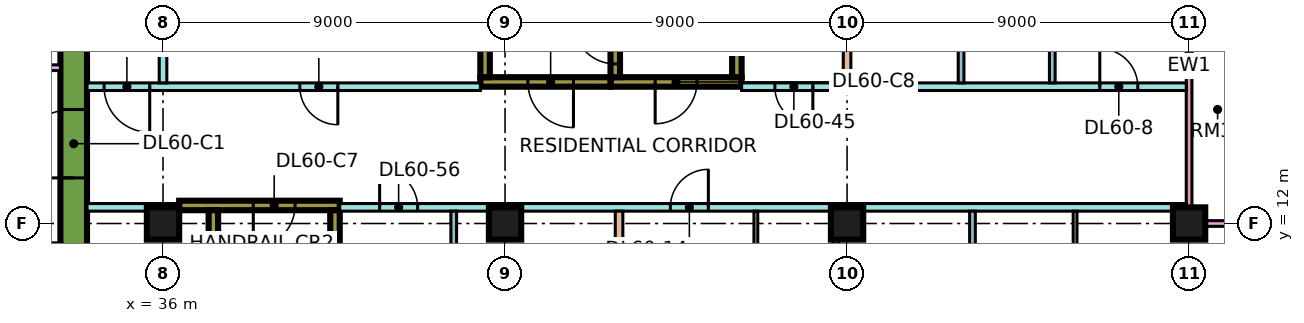
"""IFC4 building model, lengths in metres.
Left out: names, types, materials, properties, quantities, classifications, styles, units other than length and angle.
Written with IfcOpenShell. Run it as: python <this file> out.ifc"""

import sys

from ifc_helpers import new_model, si_unit, direction, frame, frame_2d, origin, origin_2d, place, context, subcontext, project, spatial, rectangle, extrude, element, fill, save


model = new_model("IFC4")
c1 = context("Model", 3, precision=1e-05, world=origin(), true_north=direction((0.0, 1.0)))
c2 = subcontext(c1, "Body", "Model", "MODEL_VIEW")
j1 = project(units=[si_unit("LENGTHUNIT", "METRE"), si_unit("PLANEANGLEUNIT", "RADIAN")], contexts=[c1])
p1 = place(None, origin())
s1 = spatial("IfcSite", under=j1, at=p1, CompositionType="ELEMENT")
p2 = place(p1, origin())
s2 = spatial("IfcBuilding", under=s1, at=p2, CompositionType="ELEMENT")
p3 = place(p2, frame((0.0, 0.0, 252.9)))
s3 = spatial("IfcBuildingStorey", under=s2, at=p3, CompositionType="ELEMENT", Elevation=252.9)
for number, where, z_axis, x_axis in (
    (1, (36.0, 12.0, 0.0), (0.0, 0.0, 1.0), (1.0, 0.0, 0.0)),
    (2, (45.0, 12.0, 0.0), (0.0, 0.0, 1.0), (1.0, 0.0, 0.0)),
    (3, (54.0, 12.0, 0.0), (0.0, 0.0, 1.0), (1.0, 0.0, 0.0)),
    (4, (63.0, 12.0, 0.0), (0.0, 0.0, 1.0), (1.0, 0.0, 0.0)),
):
    element("IfcColumn", number, at=place(p3, frame(where, z_axis=z_axis, x_axis=x_axis)), inside=s3, PredefinedType="COLUMN", context=c2, shape_type="SweptSolid", body=[
        extrude(rectangle(XDim=0.85, YDim=0.85, at=origin_2d()), origin(), (0.0, 0.0, 1.0), 3.75),
    ])
p4 = place(p3, frame((33.65, 7.7, 0.0), z_axis=(0.0, 0.0, 1.0), x_axis=(0.0, 1.0, 0.0)))
e5 = element("IfcWall", 5, at=p4, inside=s3, PredefinedType="SHEAR", context=c2, shape_type="SweptSolid", body=[
    extrude(rectangle(XDim=11.6, YDim=0.7, at=frame_2d((5.8, 0.0))), origin(), (0.0, 0.0, 1.0), 3.75),
])
p5 = place(p4, frame((5.5, 0.0, 0.0)))
e6 = element("IfcOpeningElement", 6, at=p5, cuts=e5, PredefinedType="OPENING", context=c2, shape_type="SweptSolid", body=[
    extrude(rectangle(XDim=1.8, YDim=2.4, at=frame_2d((0.9, 1.2))), frame((0.0, 0.36, 0.0), z_axis=(0.0, -1.0, 0.0), x_axis=(1.0, 0.0, 0.0)), (0.0, 0.0, 1.0), 0.72),
])
p6 = place(p3, frame((36.425, 12.475, 0.0), z_axis=(0.0, 0.0, 1.0), x_axis=(1.0, 0.0, 0.0)))
e7 = element("IfcWall", 7, at=p6, inside=s3, PredefinedType="SHEAR", context=c2, shape_type="SweptSolid", body=[
    extrude(rectangle(XDim=4.225, YDim=0.25, at=frame_2d((2.112, 0.0))), origin(), (0.0, 0.0, 1.0), 3.75),
])
p7 = place(p6, frame((1.95, 0.0, 0.0)))
e8 = element("IfcOpeningElement", 8, at=p7, cuts=e7, PredefinedType="OPENING", context=c2, shape_type="SweptSolid", body=[
    extrude(rectangle(XDim=1.1, YDim=2.2, at=frame_2d((0.55, 1.1))), frame((0.0, 0.135, 0.0), z_axis=(0.0, -1.0, 0.0), x_axis=(1.0, 0.0, 0.0)), (0.0, 0.0, 1.0), 0.27),
])
for number, where, z_axis, x_axis in (
    (9, (37.325, 5.85, 0.0), (0.0, 0.0, 1.0), (0.0, 1.0, 0.0)),
    (10, (40.525, 5.85, 0.0), (0.0, 0.0, 1.0), (0.0, 1.0, 0.0)),
):
    element("IfcWall", number, at=place(p3, frame(where, z_axis=z_axis, x_axis=x_axis)), inside=s3, PredefinedType="SHEAR", context=c2, shape_type="SweptSolid", body=[
        extrude(rectangle(XDim=6.5, YDim=0.25, at=frame_2d((3.25, 0.0))), origin(), (0.0, 0.0, 1.0), 3.75),
    ])
p8 = place(p3, frame((47.775, 15.725, 0.0), z_axis=(0.0, 0.0, 1.0), x_axis=(1.0, 0.0, 0.0)))
e11 = element("IfcWall", 11, at=p8, inside=s3, PredefinedType="SHEAR", context=c2, shape_type="SweptSolid", body=[
    extrude(rectangle(XDim=3.45, YDim=0.25, at=frame_2d((1.725, 0.0))), origin(), (0.0, 0.0, 1.0), 3.75),
])
p9 = place(p8, frame((1.175, 0.0, 0.0)))
e12 = element("IfcOpeningElement", 12, at=p9, cuts=e11, PredefinedType="OPENING", context=c2, shape_type="SweptSolid", body=[
    extrude(rectangle(XDim=1.1, YDim=2.2, at=frame_2d((0.55, 1.1))), frame((0.0, 0.135, 0.0), z_axis=(0.0, -1.0, 0.0), x_axis=(1.0, 0.0, 0.0)), (0.0, 0.0, 1.0), 0.27),
])
p10 = place(p3, frame((47.9, 15.85, 0.0), z_axis=(0.0, 0.0, 1.0), x_axis=(0.0, 1.0, 0.0)))
e13 = element("IfcWall", 13, at=p10, inside=s3, PredefinedType="SHEAR", context=c2, shape_type="SweptSolid", body=[
    extrude(rectangle(XDim=6.5, YDim=0.25, at=frame_2d((3.25, 0.0))), origin(), (0.0, 0.0, 1.0), 3.75),
])
p11 = place(p10, frame((0.35, 0.0, 0.0)))
e14 = element("IfcOpeningElement", 14, at=p11, cuts=e13, PredefinedType="OPENING", context=c2, shape_type="SweptSolid", body=[
    extrude(rectangle(XDim=1.1, YDim=2.2, at=frame_2d((0.55, 1.1))), frame((0.0, 0.135, 0.0), z_axis=(0.0, -1.0, 0.0), x_axis=(1.0, 0.0, 0.0)), (0.0, 0.0, 1.0), 0.27),
])
p12 = place(p3, frame((51.1, 15.85, 0.0), z_axis=(0.0, 0.0, 1.0), x_axis=(0.0, 1.0, 0.0)))
e15 = element("IfcWall", 15, at=p12, inside=s3, PredefinedType="SHEAR", context=c2, shape_type="SweptSolid", body=[
    extrude(rectangle(XDim=6.5, YDim=0.25, at=frame_2d((3.25, 0.0))), origin(), (0.0, 0.0, 1.0), 3.75),
])
p13 = place(p3, frame((44.35, 15.725, 0.0), z_axis=(0.0, 0.0, 1.0), x_axis=(1.0, 0.0, 0.0)))
e16 = element("IfcWall", 16, at=p13, inside=s3, PredefinedType="SHEAR", context=c2, shape_type="SweptSolid", body=[
    extrude(rectangle(XDim=3.425, YDim=0.25, at=frame_2d((1.712, 0.0))), origin(), (0.0, 0.0, 1.0), 3.75),
])
p14 = place(p13, frame((1.25, 0.0, 0.0)))
e17 = element("IfcOpeningElement", 17, at=p14, cuts=e16, PredefinedType="OPENING", context=c2, shape_type="SweptSolid", body=[
    extrude(rectangle(XDim=1.2, YDim=2.2, at=frame_2d((0.6, 1.1))), frame((0.0, 0.135, 0.0), z_axis=(0.0, -1.0, 0.0), x_axis=(1.0, 0.0, 0.0)), (0.0, 0.0, 1.0), 0.27),
])
p15 = place(p3, frame((44.475, 15.85, 0.0), z_axis=(0.0, 0.0, 1.0), x_axis=(0.0, 1.0, 0.0)))
e18 = element("IfcWall", 18, at=p15, inside=s3, PredefinedType="SHEAR", context=c2, shape_type="SweptSolid", body=[
    extrude(rectangle(XDim=6.5, YDim=0.25, at=frame_2d((3.25, 0.0))), origin(), (0.0, 0.0, 1.0), 3.75),
])
p16 = place(p15, frame((1.75, 0.0, 0.0)))
e19 = element("IfcOpeningElement", 19, at=p16, cuts=e18, PredefinedType="OPENING", context=c2, shape_type="SweptSolid", body=[
    extrude(rectangle(XDim=1.1, YDim=2.2, at=frame_2d((0.55, 1.1))), frame((0.0, 0.135, 0.0), z_axis=(0.0, -1.0, 0.0), x_axis=(1.0, 0.0, 0.0)), (0.0, 0.0, 1.0), 0.27),
])
p17 = place(p15, frame((4.3, 0.0, 0.0)))
e20 = element("IfcOpeningElement", 20, at=p17, cuts=e18, PredefinedType="OPENING", context=c2, shape_type="SweptSolid", body=[
    extrude(rectangle(XDim=1.1, YDim=2.2, at=frame_2d((0.55, 1.1))), frame((0.0, 0.135, 0.0), z_axis=(0.0, -1.0, 0.0), x_axis=(1.0, 0.0, 0.0)), (0.0, 0.0, 1.0), 0.27),
])
p18 = place(p3, frame((63.0, 12.075, 0.0), z_axis=(0.0, 0.0, 1.0), x_axis=(0.0, 1.0, 0.0)))
e21 = element("IfcWall", 21, at=p18, inside=s3, PredefinedType="SOLIDWALL", context=c2, shape_type="SweptSolid", body=[
    extrude(rectangle(XDim=10.35, YDim=0.15, at=frame_2d((5.175, 0.0))), origin(), (0.0, 0.0, 1.0), 3.3),
])
p19 = place(p18, frame((4.875, 0.0, 0.0)))
e22 = element("IfcOpeningElement", 22, at=p19, cuts=e21, PredefinedType="OPENING", context=c2, shape_type="SweptSolid", body=[
    extrude(rectangle(XDim=1.8, YDim=2.4, at=frame_2d((0.9, 1.2))), frame((0.0, 0.085, 0.0), z_axis=(0.0, -1.0, 0.0), x_axis=(1.0, 0.0, 0.0)), (0.0, 0.0, 1.0), 0.17),
])
p20 = place(p18, frame((8.587, 0.0, 0.45)))
e23 = element("IfcOpeningElement", 23, at=p20, cuts=e21, PredefinedType="OPENING", context=c2, shape_type="SweptSolid", body=[
    extrude(rectangle(XDim=1.2, YDim=2.4, at=frame_2d((0.6, 1.2))), frame((0.0, 0.085, 0.0), z_axis=(0.0, -1.0, 0.0), x_axis=(1.0, 0.0, 0.0)), (0.0, 0.0, 1.0), 0.17),
])
p21 = place(p3, frame((64.5, 12.0, 0.0), z_axis=(0.0, 0.0, 1.0), x_axis=(-1.0, 0.0, 0.0)))
e24 = element("IfcWall", 24, at=p21, inside=s3, PredefinedType="SOLIDWALL", context=c2, shape_type="SweptSolid", body=[
    extrude(rectangle(XDim=1.5, YDim=0.15, at=frame_2d((0.75, 0.0))), origin(), (0.0, 0.0, 1.0), 3.3),
])
p22 = place(p3, frame((31.3, 16.1, 0.0), z_axis=(0.0, 0.0, 1.0), x_axis=(1.0, 0.0, 0.0)))
e25 = element("IfcWall", 25, at=p22, inside=s3, PredefinedType="PARTITIONING", context=c2, shape_type="SweptSolid", body=[
    extrude(rectangle(XDim=2.0, YDim=0.15, at=frame_2d((1.0, 0.0))), origin(), (0.0, 0.0, 1.0), 3.3),
])
p23 = place(p3, frame((34.0, 12.425, 0.0), z_axis=(0.0, 0.0, 1.0), x_axis=(1.0, 0.0, 0.0)))
e26 = element("IfcWall", 26, at=p23, inside=s3, PredefinedType="PARTITIONING", context=c2, shape_type="SweptSolid", body=[
    extrude(rectangle(XDim=2.426, YDim=0.2, at=frame_2d((1.213, 0.0))), origin(), (0.0, 0.0, 1.0), 3.3),
])
p24 = place(p3, frame((34.0, 15.6, 0.0), z_axis=(0.0, 0.0, 1.0), x_axis=(1.0, 0.0, 0.0)))
e27 = element("IfcWall", 27, at=p24, inside=s3, PredefinedType="PARTITIONING", context=c2, shape_type="SweptSolid", body=[
    extrude(rectangle(XDim=10.35, YDim=0.2, at=frame_2d((5.175, 0.0))), origin(), (0.0, 0.0, 1.0), 3.3),
])
p25 = place(p24, frame((5.6, 0.0, 0.0)))
e28 = element("IfcOpeningElement", 28, at=p25, cuts=e27, PredefinedType="OPENING", context=c2, shape_type="SweptSolid", body=[
    extrude(rectangle(XDim=1.0, YDim=2.1, at=frame_2d((0.5, 1.05))), frame((0.0, 0.11, 0.0), z_axis=(0.0, -1.0, 0.0), x_axis=(1.0, 0.0, 0.0)), (0.0, 0.0, 1.0), 0.22),
])
p26 = place(p24, frame((0.45, 0.0, 0.0)))
e29 = element("IfcOpeningElement", 29, at=p26, cuts=e27, PredefinedType="OPENING", context=c2, shape_type="SweptSolid", body=[
    extrude(rectangle(XDim=1.2, YDim=2.1, at=frame_2d((0.6, 1.05))), frame((0.0, 0.11, 0.0), z_axis=(0.0, -1.0, 0.0), x_axis=(1.0, 0.0, 0.0)), (0.0, 0.0, 1.0), 0.22),
])
p27 = place(p3, frame((36.0, 15.7, 0.0), z_axis=(0.0, 0.0, 1.0), x_axis=(0.0, 1.0, 0.0)))
e30 = element("IfcWall", 30, at=p27, inside=s3, PredefinedType="PARTITIONING", context=c2, shape_type="SweptSolid", body=[
    extrude(rectangle(XDim=8.3, YDim=0.2, at=frame_2d((4.15, 0.0))), origin(), (0.0, 0.0, 1.0), 3.3),
])
p28 = place(p3, frame((40.65, 12.425, 0.0), z_axis=(0.0, 0.0, 1.0), x_axis=(1.0, 0.0, 0.0)))
e31 = element("IfcWall", 31, at=p28, inside=s3, PredefinedType="PARTITIONING", context=c2, shape_type="SweptSolid", body=[
    extrude(rectangle(XDim=22.276, YDim=0.2, at=frame_2d((11.138, 0.0))), origin(), (0.0, 0.0, 1.0), 3.3),
])
p29 = place(p28, frame((8.7, 0.0, 0.0)))
e32 = element("IfcOpeningElement", 32, at=p29, cuts=e31, PredefinedType="OPENING", context=c2, shape_type="SweptSolid", body=[
    extrude(rectangle(XDim=1.0, YDim=2.1, at=frame_2d((0.5, 1.05))), frame((0.0, 0.11, 0.0), z_axis=(0.0, -1.0, 0.0), x_axis=(1.0, 0.0, 0.0)), (0.0, 0.0, 1.0), 0.22),
])
p30 = place(p28, frame((1.05, 0.0, 0.0)))
e33 = element("IfcOpeningElement", 33, at=p30, cuts=e31, PredefinedType="OPENING", context=c2, shape_type="SweptSolid", body=[
    extrude(rectangle(XDim=1.0, YDim=2.1, at=frame_2d((0.5, 1.05))), frame((0.0, 0.11, 0.0), z_axis=(0.0, -1.0, 0.0), x_axis=(1.0, 0.0, 0.0)), (0.0, 0.0, 1.0), 0.22),
])
p31 = place(p3, frame((43.65, 5.825, 0.0), z_axis=(0.0, 0.0, 1.0), x_axis=(0.0, 1.0, 0.0)))
e34 = element("IfcWall", 34, at=p31, inside=s3, PredefinedType="PARTITIONING", context=c2, shape_type="SweptSolid", body=[
    extrude(rectangle(XDim=6.5, YDim=0.15, at=frame_2d((3.25, 0.0))), origin(), (0.0, 0.0, 1.0), 3.3),
])
p32 = place(p31, frame((4.425, 0.0, 0.0)))
e35 = element("IfcOpeningElement", 35, at=p32, cuts=e34, PredefinedType="OPENING", context=c2, shape_type="SweptSolid", body=[
    extrude(rectangle(XDim=0.9, YDim=2.1, at=frame_2d((0.45, 1.05))), frame((0.0, 0.085, 0.0), z_axis=(0.0, -1.0, 0.0), x_axis=(1.0, 0.0, 0.0)), (0.0, 0.0, 1.0), 0.17),
])
p33 = place(p3, frame((48.0, 0.0, 0.0), z_axis=(0.0, 0.0, 1.0), x_axis=(0.0, 1.0, 0.0)))
e36 = element("IfcWall", 36, at=p33, inside=s3, PredefinedType="PARTITIONING", context=c2, shape_type="SweptSolid", body=[
    extrude(rectangle(XDim=12.325, YDim=0.2, at=frame_2d((6.163, 0.0))), origin(), (0.0, 0.0, 1.0), 3.3),
])
p34 = place(p3, frame((51.225, 15.6, 0.0), z_axis=(0.0, 0.0, 1.0), x_axis=(1.0, 0.0, 0.0)))
e37 = element("IfcWall", 37, at=p34, inside=s3, PredefinedType="PARTITIONING", context=c2, shape_type="SweptSolid", body=[
    extrude(rectangle(XDim=11.701, YDim=0.2, at=frame_2d((5.851, 0.0))), origin(), (0.0, 0.0, 1.0), 3.3),
])
p35 = place(p34, frame((9.425, 0.0, 0.0)))
e38 = element("IfcOpeningElement", 38, at=p35, cuts=e37, PredefinedType="OPENING", context=c2, shape_type="SweptSolid", body=[
    extrude(rectangle(XDim=1.0, YDim=2.1, at=frame_2d((0.5, 1.05))), frame((0.0, 0.11, 0.0), z_axis=(0.0, -1.0, 0.0), x_axis=(1.0, 0.0, 0.0)), (0.0, 0.0, 1.0), 0.22),
])
p36 = place(p34, frame((0.875, 0.0, 0.0)))
e39 = element("IfcOpeningElement", 39, at=p36, cuts=e37, PredefinedType="OPENING", context=c2, shape_type="SweptSolid", body=[
    extrude(rectangle(XDim=1.0, YDim=2.1, at=frame_2d((0.5, 1.05))), frame((0.0, 0.11, 0.0), z_axis=(0.0, -1.0, 0.0), x_axis=(1.0, 0.0, 0.0)), (0.0, 0.0, 1.0), 0.22),
])
p37 = place(p3, frame((51.6, 7.7, 0.0), z_axis=(0.0, 0.0, 1.0), x_axis=(0.0, 1.0, 0.0)))
e40 = element("IfcWall", 40, at=p37, inside=s3, PredefinedType="PARTITIONING", context=c2, shape_type="SweptSolid", body=[
    extrude(rectangle(XDim=4.625, YDim=0.1, at=frame_2d((2.312, 0.0))), origin(), (0.0, 0.0, 1.0), 3.3),
])
p38 = place(p37, frame((1.875, 0.0, 0.0)))
e41 = element("IfcOpeningElement", 41, at=p38, cuts=e40, PredefinedType="OPENING", context=c2, shape_type="SweptSolid", body=[
    extrude(rectangle(XDim=0.9, YDim=2.1, at=frame_2d((0.45, 1.05))), frame((0.0, 0.06, 0.0), z_axis=(0.0, -1.0, 0.0), x_axis=(1.0, 0.0, 0.0)), (0.0, 0.0, 1.0), 0.12),
])
p39 = place(p3, frame((53.7, 7.7, 0.0), z_axis=(0.0, 0.0, 1.0), x_axis=(0.0, 1.0, 0.0)))
e42 = element("IfcWall", 42, at=p39, inside=s3, PredefinedType="PARTITIONING", context=c2, shape_type="SweptSolid", body=[
    extrude(rectangle(XDim=4.625, YDim=0.15, at=frame_2d((2.312, 0.0))), origin(), (0.0, 0.0, 1.0), 3.3),
])
p40 = place(p3, frame((54.0, 15.7, 0.0), z_axis=(0.0, 0.0, 1.0), x_axis=(0.0, 1.0, 0.0)))
e43 = element("IfcWall", 43, at=p40, inside=s3, PredefinedType="PARTITIONING", context=c2, shape_type="SweptSolid", body=[
    extrude(rectangle(XDim=8.3, YDim=0.2, at=frame_2d((4.15, 0.0))), origin(), (0.0, 0.0, 1.0), 3.3),
])
p41 = place(p3, frame((57.0, 15.7, 0.0), z_axis=(0.0, 0.0, 1.0), x_axis=(0.0, 1.0, 0.0)))
e44 = element("IfcWall", 44, at=p41, inside=s3, PredefinedType="PARTITIONING", context=c2, shape_type="SweptSolid", body=[
    extrude(rectangle(XDim=3.125, YDim=0.15, at=frame_2d((1.562, 0.0))), origin(), (0.0, 0.0, 1.0), 3.3),
])
p42 = place(p3, frame((57.3, 7.7, 0.0), z_axis=(0.0, 0.0, 1.0), x_axis=(0.0, 1.0, 0.0)))
e45 = element("IfcWall", 45, at=p42, inside=s3, PredefinedType="PARTITIONING", context=c2, shape_type="SweptSolid", body=[
    extrude(rectangle(XDim=4.625, YDim=0.15, at=frame_2d((2.312, 0.0))), origin(), (0.0, 0.0, 1.0), 3.3),
])
p43 = place(p3, frame((59.4, 15.7, 0.0), z_axis=(0.0, 0.0, 1.0), x_axis=(0.0, 1.0, 0.0)))
e46 = element("IfcWall", 46, at=p43, inside=s3, PredefinedType="PARTITIONING", context=c2, shape_type="SweptSolid", body=[
    extrude(rectangle(XDim=3.125, YDim=0.15, at=frame_2d((1.562, 0.0))), origin(), (0.0, 0.0, 1.0), 3.3),
])
p44 = place(p3, frame((60.0, 7.7, 0.0), z_axis=(0.0, 0.0, 1.0), x_axis=(0.0, 1.0, 0.0)))
e47 = element("IfcWall", 47, at=p44, inside=s3, PredefinedType="PARTITIONING", context=c2, shape_type="SweptSolid", body=[
    extrude(rectangle(XDim=4.625, YDim=0.1, at=frame_2d((2.312, 0.0))), origin(), (0.0, 0.0, 1.0), 3.3),
])
p45 = place(p5, origin())
e48 = element("IfcDoor", 48, at=p45, inside=s3, OperationType="DOUBLE_DOOR_SINGLE_SWING", PredefinedType="DOOR", context=c2, shape_type="SweptSolid", body=[
    extrude(rectangle(XDim=1.8, YDim=2.4, at=frame_2d((0.9, 1.2))), frame((0.0, 0.025, 0.0), z_axis=(0.0, -1.0, 0.0), x_axis=(1.0, 0.0, 0.0)), (0.0, 0.0, 1.0), 0.05),
])
fill(e6, e48)
p46 = place(p7, frame((1.1, 0.0, 0.0), z_axis=(0.0, 0.0, 1.0), x_axis=(-1.0, 0.0, 0.0)))
e49 = element("IfcDoor", 49, at=p46, inside=s3, OperationType="SINGLE_SWING_LEFT", PredefinedType="DOOR", context=c2, shape_type="SweptSolid", body=[
    extrude(rectangle(XDim=1.1, YDim=2.2, at=frame_2d((0.55, 1.1))), frame((0.0, 0.025, 0.0), z_axis=(0.0, -1.0, 0.0), x_axis=(1.0, 0.0, 0.0)), (0.0, 0.0, 1.0), 0.05),
])
fill(e8, e49)
p47 = place(p9, frame((1.1, 0.0, 0.0), z_axis=(0.0, 0.0, 1.0), x_axis=(-1.0, 0.0, 0.0)))
e50 = element("IfcDoor", 50, at=p47, inside=s3, OperationType="SINGLE_SWING_LEFT", PredefinedType="DOOR", context=c2, shape_type="SweptSolid", body=[
    extrude(rectangle(XDim=1.1, YDim=2.2, at=frame_2d((0.55, 1.1))), frame((0.0, 0.025, 0.0), z_axis=(0.0, -1.0, 0.0), x_axis=(1.0, 0.0, 0.0)), (0.0, 0.0, 1.0), 0.05),
])
fill(e12, e50)
p48 = place(p14, origin())
e51 = element("IfcDoor", 51, at=p48, inside=s3, OperationType="SINGLE_SWING_RIGHT", PredefinedType="DOOR", context=c2, shape_type="SweptSolid", body=[
    extrude(rectangle(XDim=1.2, YDim=2.2, at=frame_2d((0.6, 1.1))), frame((0.0, 0.025, 0.0), z_axis=(0.0, -1.0, 0.0), x_axis=(1.0, 0.0, 0.0)), (0.0, 0.0, 1.0), 0.05),
])
fill(e17, e51)
p49 = place(p11, frame((1.1, 0.0, 0.0), z_axis=(0.0, 0.0, 1.0), x_axis=(-1.0, 0.0, 0.0)))
e52 = element("IfcDoor", 52, at=p49, inside=s3, OperationType="SINGLE_SWING_RIGHT", PredefinedType="DOOR", context=c2, shape_type="SweptSolid", body=[
    extrude(rectangle(XDim=1.1, YDim=2.2, at=frame_2d((0.55, 1.1))), frame((0.0, 0.025, 0.0), z_axis=(0.0, -1.0, 0.0), x_axis=(1.0, 0.0, 0.0)), (0.0, 0.0, 1.0), 0.05),
])
fill(e14, e52)
p50 = place(p25, origin())
e53 = element("IfcDoor", 53, at=p50, inside=s3, OperationType="SINGLE_SWING_RIGHT", PredefinedType="DOOR", context=c2, shape_type="SweptSolid", body=[
    extrude(rectangle(XDim=1.0, YDim=2.1, at=frame_2d((0.5, 1.05))), frame((0.0, 0.025, 0.0), z_axis=(0.0, -1.0, 0.0), x_axis=(1.0, 0.0, 0.0)), (0.0, 0.0, 1.0), 0.05),
])
fill(e28, e53)
p51 = place(p35, origin())
e54 = element("IfcDoor", 54, at=p51, inside=s3, OperationType="SINGLE_SWING_LEFT", PredefinedType="DOOR", context=c2, shape_type="SweptSolid", body=[
    extrude(rectangle(XDim=1.0, YDim=2.1, at=frame_2d((0.5, 1.05))), frame((0.0, 0.025, 0.0), z_axis=(0.0, -1.0, 0.0), x_axis=(1.0, 0.0, 0.0)), (0.0, 0.0, 1.0), 0.05),
])
fill(e38, e54)
p52 = place(p29, frame((1.0, 0.0, 0.0), z_axis=(0.0, 0.0, 1.0), x_axis=(-1.0, 0.0, 0.0)))
e55 = element("IfcDoor", 55, at=p52, inside=s3, OperationType="SINGLE_SWING_RIGHT", PredefinedType="DOOR", context=c2, shape_type="SweptSolid", body=[
    extrude(rectangle(XDim=1.0, YDim=2.1, at=frame_2d((0.5, 1.05))), frame((0.0, 0.025, 0.0), z_axis=(0.0, -1.0, 0.0), x_axis=(1.0, 0.0, 0.0)), (0.0, 0.0, 1.0), 0.05),
])
fill(e32, e55)
p53 = place(p26, origin())
e56 = element("IfcDoor", 56, at=p53, inside=s3, OperationType="SINGLE_SWING_RIGHT", PredefinedType="DOOR", context=c2, shape_type="SweptSolid", body=[
    extrude(rectangle(XDim=1.2, YDim=2.1, at=frame_2d((0.6, 1.05))), frame((0.0, 0.025, 0.0), z_axis=(0.0, -1.0, 0.0), x_axis=(1.0, 0.0, 0.0)), (0.0, 0.0, 1.0), 0.05),
])
fill(e29, e56)
p54 = place(p36, origin())
e57 = element("IfcDoor", 57, at=p54, inside=s3, OperationType="SINGLE_SWING_RIGHT", PredefinedType="DOOR", context=c2, shape_type="SweptSolid", body=[
    extrude(rectangle(XDim=1.0, YDim=2.1, at=frame_2d((0.5, 1.05))), frame((0.0, 0.025, 0.0), z_axis=(0.0, -1.0, 0.0), x_axis=(1.0, 0.0, 0.0)), (0.0, 0.0, 1.0), 0.05),
])
fill(e39, e57)
p55 = place(p30, origin())
e58 = element("IfcDoor", 58, at=p55, inside=s3, OperationType="SINGLE_SWING_LEFT", PredefinedType="DOOR", context=c2, shape_type="SweptSolid", body=[
    extrude(rectangle(XDim=1.0, YDim=2.1, at=frame_2d((0.5, 1.05))), frame((0.0, 0.025, 0.0), z_axis=(0.0, -1.0, 0.0), x_axis=(1.0, 0.0, 0.0)), (0.0, 0.0, 1.0), 0.05),
])
fill(e33, e58)
save(model, sys.argv[1])
